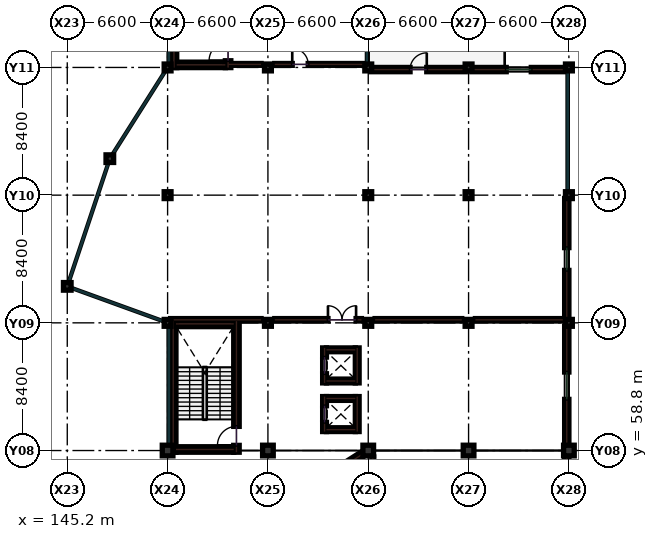
"""IFC4 building model, lengths in metres.
Left out: names, types, materials, properties, quantities, classifications, styles, units other than length and angle.
Written with IfcOpenShell. Run it as: python <this file> out.ifc"""

import sys

from ifc_helpers import new_model, si_unit, direction, frame, frame_2d, origin, origin_2d, place, context, subcontext, project, spatial, rectangle, extrude, element, fill, save


model = new_model("IFC4")
c1 = context("Model", 3, precision=1e-05, world=origin(), true_north=direction((0.0, 1.0)))
c2 = subcontext(c1, "Body", "Model", "MODEL_VIEW")
j1 = project(units=[si_unit("LENGTHUNIT", "METRE"), si_unit("PLANEANGLEUNIT", "RADIAN")], contexts=[c1])
p1 = place(None, origin())
s1 = spatial("IfcSite", under=j1, at=p1, CompositionType="ELEMENT")
p2 = place(p1, origin())
s2 = spatial("IfcBuilding", under=s1, at=p2, CompositionType="ELEMENT")
p3 = place(p2, frame((0.0, 0.0, 14.4)))
s3 = spatial("IfcBuildingStorey", under=s2, at=p3, CompositionType="ELEMENT", Elevation=14.4)
p4 = place(p3, frame((151.8, 58.8, 0.0), z_axis=(0.0, 0.0, 1.0), x_axis=(1.0, 0.0, 0.0)))
e1 = element("IfcColumn", 1, at=p4, inside=s3, PredefinedType="COLUMN", context=c2, shape_type="SweptSolid", body=[
    extrude(rectangle(XDim=0.7, YDim=0.7, at=origin_2d()), origin(), (0.0, 0.0, 1.0), 4.2),
])
for number, where, z_axis, x_axis in (
    (2, (151.8, 67.2, 0.0), (0.0, 0.0, 1.0), (1.0, 0.0, 0.0)),
    (3, (151.8, 75.6, 0.0), (0.0, 0.0, 1.0), (1.0, 0.0, 0.0)),
    (4, (151.8, 84.0, 0.0), (0.0, 0.0, 1.0), (1.0, 0.0, 0.0)),
):
    element("IfcColumn", number, at=place(p3, frame(where, z_axis=z_axis, x_axis=x_axis)), inside=s3, PredefinedType="COLUMN", context=c2, shape_type="SweptSolid", body=[
        extrude(rectangle(XDim=0.45, YDim=0.45, at=origin_2d()), origin(), (0.0, 0.0, 1.0), 4.2),
    ])
p5 = place(p3, frame((158.4, 58.8, 0.0), z_axis=(0.0, 0.0, 1.0), x_axis=(1.0, 0.0, 0.0)))
e5 = element("IfcColumn", 5, at=p5, inside=s3, PredefinedType="COLUMN", context=c2, shape_type="SweptSolid", body=[
    extrude(rectangle(XDim=0.7, YDim=0.7, at=origin_2d()), origin(), (0.0, 0.0, 1.0), 4.2),
])
for number, where, z_axis, x_axis in (
    (6, (158.4, 67.2, 0.0), (0.0, 0.0, 1.0), (1.0, 0.0, 0.0)),
    (7, (158.4, 84.0, 0.0), (0.0, 0.0, 1.0), (1.0, 0.0, 0.0)),
):
    element("IfcColumn", number, at=place(p3, frame(where, z_axis=z_axis, x_axis=x_axis)), inside=s3, PredefinedType="COLUMN", context=c2, shape_type="SweptSolid", body=[
        extrude(rectangle(XDim=0.45, YDim=0.45, at=origin_2d()), origin(), (0.0, 0.0, 1.0), 4.2),
    ])
p6 = place(p3, frame((165.0, 58.8, 0.0), z_axis=(0.0, 0.0, 1.0), x_axis=(1.0, 0.0, 0.0)))
e8 = element("IfcColumn", 8, at=p6, inside=s3, PredefinedType="COLUMN", context=c2, shape_type="SweptSolid", body=[
    extrude(rectangle(XDim=0.7, YDim=0.7, at=origin_2d()), origin(), (0.0, 0.0, 1.0), 4.2),
])
for number, where, z_axis, x_axis in (
    (9, (165.0, 67.2, 0.0), (0.0, 0.0, 1.0), (1.0, 0.0, 0.0)),
    (10, (165.0, 75.6, 0.0), (0.0, 0.0, 1.0), (1.0, 0.0, 0.0)),
    (11, (165.0, 84.0, 0.0), (0.0, 0.0, 1.0), (1.0, 0.0, 0.0)),
):
    element("IfcColumn", number, at=place(p3, frame(where, z_axis=z_axis, x_axis=x_axis)), inside=s3, PredefinedType="COLUMN", context=c2, shape_type="SweptSolid", body=[
        extrude(rectangle(XDim=0.45, YDim=0.45, at=origin_2d()), origin(), (0.0, 0.0, 1.0), 4.2),
    ])
p7 = place(p3, frame((171.6, 58.8, 0.0), z_axis=(0.0, 0.0, 1.0), x_axis=(1.0, 0.0, 0.0)))
e12 = element("IfcColumn", 12, at=p7, inside=s3, PredefinedType="COLUMN", context=c2, shape_type="SweptSolid", body=[
    extrude(rectangle(XDim=0.7, YDim=0.7, at=origin_2d()), origin(), (0.0, 0.0, 1.0), 4.2),
])
for number, where, z_axis, x_axis in (
    (13, (171.6, 67.2, 0.0), (0.0, 0.0, 1.0), (1.0, 0.0, 0.0)),
    (14, (171.6, 75.6, 0.0), (0.0, 0.0, 1.0), (1.0, 0.0, 0.0)),
    (15, (171.6, 84.0, 0.0), (0.0, 0.0, 1.0), (1.0, 0.0, 0.0)),
):
    element("IfcColumn", number, at=place(p3, frame(where, z_axis=z_axis, x_axis=x_axis)), inside=s3, PredefinedType="COLUMN", context=c2, shape_type="SweptSolid", body=[
        extrude(rectangle(XDim=0.45, YDim=0.45, at=origin_2d()), origin(), (0.0, 0.0, 1.0), 4.2),
    ])
p8 = place(p3, frame((178.2, 58.8, 0.0), z_axis=(0.0, 0.0, 1.0), x_axis=(1.0, 0.0, 0.0)))
e16 = element("IfcColumn", 16, at=p8, inside=s3, PredefinedType="COLUMN", context=c2, shape_type="SweptSolid", body=[
    extrude(rectangle(XDim=0.7, YDim=0.7, at=origin_2d()), origin(), (0.0, 0.0, 1.0), 4.2),
])
for number, where, z_axis, x_axis in (
    (17, (178.2, 67.2, 0.0), (0.0, 0.0, 1.0), (1.0, 0.0, 0.0)),
    (18, (178.2, 75.6, 0.0), (0.0, 0.0, 1.0), (1.0, 0.0, 0.0)),
    (19, (178.2, 84.0, 0.0), (0.0, 0.0, 1.0), (1.0, 0.0, 0.0)),
):
    element("IfcColumn", number, at=place(p3, frame(where, z_axis=z_axis, x_axis=x_axis)), inside=s3, PredefinedType="COLUMN", context=c2, shape_type="SweptSolid", body=[
        extrude(rectangle(XDim=0.45, YDim=0.45, at=origin_2d()), origin(), (0.0, 0.0, 1.0), 4.2),
    ])
for number, where, z_axis, x_axis in (
    (20, (145.2, 69.6, 0.0), (0.0, 0.0, 1.0), (1.0, 0.0, 0.0)),
    (21, (148.0, 78.0, 0.0), (0.0, 0.0, 1.0), (1.0, 0.0, 0.0)),
):
    element("IfcColumn", number, at=place(p3, frame(where, z_axis=z_axis, x_axis=x_axis)), inside=s3, PredefinedType="COLUMN", context=c2, shape_type="SweptSolid", body=[
        extrude(rectangle(XDim=0.5, YDim=0.5, at=origin_2d()), origin(), (0.0, 0.0, 1.0), 4.2),
    ])
p9 = place(p3, frame((152.0, 67.4, 0.0), z_axis=(0.0, 0.0, 1.0), x_axis=(1.0, 0.0, 0.0)))
e22 = element("IfcWall", 22, at=p9, inside=s3, PredefinedType="PARTITIONING", context=c2, shape_type="SweptSolid", body=[
    extrude(rectangle(XDim=5.95, YDim=0.16, at=frame_2d((2.975, 0.0))), origin(), (0.0, 0.0, 1.0), 3.19),
])
p10 = place(p3, frame((158.85, 67.4, 0.0), z_axis=(0.0, 0.0, 1.0), x_axis=(1.0, 0.0, 0.0)))
e23 = element("IfcWall", 23, at=p10, inside=s3, PredefinedType="PARTITIONING", context=c2, shape_type="SweptSolid", body=[
    extrude(rectangle(XDim=5.7, YDim=0.16, at=frame_2d((2.85, 0.0))), origin(), (0.0, 0.0, 1.0), 3.19),
])
p11 = place(p10, frame((3.5, 0.0, 0.0)))
e24 = element("IfcOpeningElement", 24, at=p11, cuts=e23, PredefinedType="OPENING", context=c2, shape_type="SweptSolid", body=[
    extrude(rectangle(XDim=1.85, YDim=2.25, at=frame_2d((0.925, 1.125))), frame((0.0, 0.09, 0.0), z_axis=(0.0, -1.0, 0.0), x_axis=(1.0, 0.0, 0.0)), (0.0, 0.0, 1.0), 0.18),
])
p12 = place(p3, frame((165.45, 67.4, 0.0), z_axis=(0.0, 0.0, 1.0), x_axis=(1.0, 0.0, 0.0)))
e25 = element("IfcWall", 25, at=p12, inside=s3, PredefinedType="PARTITIONING", context=c2, shape_type="SweptSolid", body=[
    extrude(rectangle(XDim=5.7, YDim=0.16, at=frame_2d((2.85, 0.0))), origin(), (0.0, 0.0, 1.0), 3.19),
])
p13 = place(p3, frame((172.05, 67.4, 0.0), z_axis=(0.0, 0.0, 1.0), x_axis=(1.0, 0.0, 0.0)))
e26 = element("IfcWall", 26, at=p13, inside=s3, PredefinedType="PARTITIONING", context=c2, shape_type="SweptSolid", body=[
    extrude(rectangle(XDim=5.83, YDim=0.16, at=frame_2d((2.915, 0.0))), origin(), (0.0, 0.0, 1.0), 3.19),
])
p14 = place(p3, frame((155.8, 84.2, 0.0), z_axis=(0.0, 0.0, 1.0), x_axis=(1.0, 0.0, 0.0)))
e27 = element("IfcWall", 27, at=p14, inside=s3, PredefinedType="PARTITIONING", context=c2, shape_type="SweptSolid", body=[
    extrude(rectangle(XDim=2.15, YDim=0.12, at=frame_2d((1.075, 0.0))), origin(), (0.0, 0.0, 1.0), 3.19),
])
p15 = place(p3, frame((158.85, 84.2, 0.0), z_axis=(0.0, 0.0, 1.0), x_axis=(1.0, 0.0, 0.0)))
e28 = element("IfcWall", 28, at=p15, inside=s3, PredefinedType="PARTITIONING", context=c2, shape_type="SweptSolid", body=[
    extrude(rectangle(XDim=5.83, YDim=0.12, at=frame_2d((2.915, 0.0))), origin(), (0.0, 0.0, 1.0), 3.19),
])
p16 = place(p15, frame((1.15, 0.0, 0.0)))
e29 = element("IfcOpeningElement", 29, at=p16, cuts=e28, PredefinedType="OPENING", context=c2, shape_type="SweptSolid", body=[
    extrude(rectangle(XDim=1.05, YDim=2.15, at=frame_2d((0.525, 1.075))), frame((0.0, 0.07, 0.0), z_axis=(0.0, -1.0, 0.0), x_axis=(1.0, 0.0, 0.0)), (0.0, 0.0, 1.0), 0.14),
])
p17 = place(p3, frame((165.3, 50.85, 0.0), z_axis=(0.0, 0.0, 1.0), x_axis=(0.0, 1.0, 0.0)))
e30 = element("IfcWall", 30, at=p17, inside=s3, PredefinedType="PARTITIONING", context=c2, shape_type="SweptSolid", body=[
    extrude(rectangle(XDim=7.53, YDim=0.12, at=frame_2d((3.765, 0.0))), origin(), (0.0, 0.0, 1.0), 3.19),
])
p18 = place(p17, frame((4.4, 0.0, 0.0)))
e31 = element("IfcOpeningElement", 31, at=p18, cuts=e30, PredefinedType="OPENING", context=c2, shape_type="SweptSolid", body=[
    extrude(rectangle(XDim=0.95, YDim=2.15, at=frame_2d((0.475, 1.075))), frame((0.0, 0.07, 0.0), z_axis=(0.0, -1.0, 0.0), x_axis=(1.0, 0.0, 0.0)), (0.0, 0.0, 1.0), 0.14),
])
p19 = place(p3, frame((171.38, 83.86, 0.0), z_axis=(0.0, 0.0, 1.0), x_axis=(-1.0, 0.0, 0.0)))
e32 = element("IfcWall", 32, at=p19, inside=s3, PredefinedType="SOLIDWALL", context=c2, shape_type="SweptSolid", body=[
    extrude(rectangle(XDim=6.16, YDim=0.28, at=frame_2d((3.08, 0.0))), origin(), (0.0, 0.0, 1.0), 3.325),
])
p20 = place(p19, frame((2.53, 0.0, 0.0)))
e33 = element("IfcOpeningElement", 33, at=p20, cuts=e32, PredefinedType="OPENING", context=c2, shape_type="SweptSolid", body=[
    extrude(rectangle(XDim=1.1, YDim=2.2, at=frame_2d((0.55, 1.1))), frame((0.0, 0.15, 0.0), z_axis=(0.0, -1.0, 0.0), x_axis=(1.0, 0.0, 0.0)), (0.0, 0.0, 1.0), 0.3),
])
p21 = place(p3, frame((178.06, 50.745, 0.0), z_axis=(0.0, 0.0, 1.0), x_axis=(0.0, 1.0, 0.0)))
e34 = element("IfcWall", 34, at=p21, inside=s3, PredefinedType="SOLIDWALL", context=c2, shape_type="SweptSolid", body=[
    extrude(rectangle(XDim=7.71, YDim=0.28, at=frame_2d((3.855, 0.0))), origin(), (0.0, 0.0, 1.0), 3.225),
])
p22 = place(p21, frame((3.13, 0.0, 0.95)))
e35 = element("IfcOpeningElement", 35, at=p22, cuts=e34, PredefinedType="OPENING", context=c2, shape_type="SweptSolid", body=[
    extrude(rectangle(XDim=1.45, YDim=1.6, at=frame_2d((0.725, 0.8))), frame((0.0, 0.15, 0.0), z_axis=(0.0, -1.0, 0.0), x_axis=(1.0, 0.0, 0.0)), (0.0, 0.0, 1.0), 0.3),
])
p23 = place(p3, frame((178.06, 59.145, 0.0), z_axis=(0.0, 0.0, 1.0), x_axis=(0.0, 1.0, 0.0)))
e36 = element("IfcWall", 36, at=p23, inside=s3, PredefinedType="SOLIDWALL", context=c2, shape_type="SweptSolid", body=[
    extrude(rectangle(XDim=7.835, YDim=0.28, at=frame_2d((3.917, 0.0))), origin(), (0.0, 0.0, 1.0), 3.375),
])
p24 = place(p23, frame((3.02, 0.0, 0.95)))
e37 = element("IfcOpeningElement", 37, at=p24, cuts=e36, PredefinedType="OPENING", context=c2, shape_type="SweptSolid", body=[
    extrude(rectangle(XDim=1.8, YDim=1.6, at=frame_2d((0.9, 0.8))), frame((0.0, 0.15, 0.0), z_axis=(0.0, -1.0, 0.0), x_axis=(1.0, 0.0, 0.0)), (0.0, 0.0, 1.0), 0.3),
])
p25 = place(p3, frame((178.06, 67.42, 0.0), z_axis=(0.0, 0.0, 1.0), x_axis=(0.0, 1.0, 0.0)))
e38 = element("IfcWall", 38, at=p25, inside=s3, PredefinedType="SOLIDWALL", context=c2, shape_type="SweptSolid", body=[
    extrude(rectangle(XDim=7.96, YDim=0.28, at=frame_2d((3.98, 0.0))), origin(), (0.0, 0.0, 1.0), 3.225),
])
p26 = place(p25, frame((3.23, 0.0, 0.95)))
e39 = element("IfcOpeningElement", 39, at=p26, cuts=e38, PredefinedType="OPENING", context=c2, shape_type="SweptSolid", body=[
    extrude(rectangle(XDim=1.5, YDim=2.1, at=frame_2d((0.75, 1.05))), frame((0.0, 0.15, 0.0), z_axis=(0.0, -1.0, 0.0), x_axis=(1.0, 0.0, 0.0)), (0.0, 0.0, 1.0), 0.3),
])
p27 = place(p3, frame((177.98, 83.86, 0.0), z_axis=(0.0, 0.0, 1.0), x_axis=(-1.0, 0.0, 0.0)))
e40 = element("IfcWall", 40, at=p27, inside=s3, PredefinedType="SOLIDWALL", context=c2, shape_type="SweptSolid", body=[
    extrude(rectangle(XDim=6.16, YDim=0.28, at=frame_2d((3.08, 0.0))), origin(), (0.0, 0.0, 1.0), 3.325),
])
p28 = place(p27, frame((2.255, 0.0, 0.95)))
e41 = element("IfcOpeningElement", 41, at=p28, cuts=e40, PredefinedType="OPENING", context=c2, shape_type="SweptSolid", body=[
    extrude(rectangle(XDim=1.65, YDim=1.55, at=frame_2d((0.825, 0.775))), frame((0.0, 0.15, 0.0), z_axis=(0.0, -1.0, 0.0), x_axis=(1.0, 0.0, 0.0)), (0.0, 0.0, 1.0), 0.3),
])
p29 = place(p3, frame((158.65, 54.76, 0.0), z_axis=(0.0, 0.0, 1.0), x_axis=(0.843786613851, 0.536678814829, 0.0)))
e42 = element("IfcWall", 42, at=p29, inside=s3, PredefinedType="SHEAR", context=c2, shape_type="SweptSolid", body=[
    extrude(rectangle(XDim=7.229, YDim=0.34, at=frame_2d((3.615, 0.0))), origin(), (0.0, 0.0, 1.0), 3.94),
])
p30 = place(p3, frame((152.17, 58.69, 0.0), z_axis=(0.0, 0.0, 1.0), x_axis=(0.0, 1.0, 0.0)))
e43 = element("IfcWall", 43, at=p30, inside=s3, PredefinedType="SHEAR", context=c2, shape_type="SweptSolid", body=[
    extrude(rectangle(XDim=8.62, YDim=0.36, at=frame_2d((4.31, 0.0))), origin(), (0.0, 0.0, 1.0), 3.94),
])
p31 = place(p3, frame((156.33, 58.69, 0.0), z_axis=(0.0, 0.0, 1.0), x_axis=(0.0, 1.0, 0.0)))
e44 = element("IfcWall", 44, at=p31, inside=s3, PredefinedType="SHEAR", context=c2, shape_type="SweptSolid", body=[
    extrude(rectangle(XDim=8.62, YDim=0.36, at=frame_2d((4.31, 0.0))), origin(), (0.0, 0.0, 1.0), 3.94),
])
p32 = place(p31, frame((0.45, 0.0, 0.0)))
e45 = element("IfcOpeningElement", 45, at=p32, cuts=e44, PredefinedType="OPENING", context=c2, shape_type="SweptSolid", body=[
    extrude(rectangle(XDim=1.25, YDim=2.15, at=frame_2d((0.625, 1.075))), frame((0.0, 0.19, 0.0), z_axis=(0.0, -1.0, 0.0), x_axis=(1.0, 0.0, 0.0)), (0.0, 0.0, 1.0), 0.38),
])
for number, where, z_axis, x_axis in (
    (46, (152.35, 67.13, 0.0), (0.0, 0.0, 1.0), (1.0, 0.0, 0.0)),
    (47, (152.35, 58.87, 0.0), (0.0, 0.0, 1.0), (1.0, 0.0, 0.0)),
):
    element("IfcWall", number, at=place(p3, frame(where, z_axis=z_axis, x_axis=x_axis)), inside=s3, PredefinedType="SHEAR", context=c2, shape_type="SweptSolid", body=[
        extrude(rectangle(XDim=3.8, YDim=0.36, at=frame_2d((1.9, 0.0))), origin(), (0.0, 0.0, 1.0), 3.94),
    ])
p33 = place(p3, frame((152.22, 83.99, 0.0), z_axis=(0.0, 0.0, 1.0), x_axis=(0.0, 1.0, 0.0)))
e48 = element("IfcWall", 48, at=p33, inside=s3, PredefinedType="SHEAR", context=c2, shape_type="SweptSolid", body=[
    extrude(rectangle(XDim=8.17, YDim=0.36, at=frame_2d((4.085, 0.0))), origin(), (0.0, 0.0, 1.0), 3.94),
])
p34 = place(p3, frame((155.78, 83.99, 0.0), z_axis=(0.0, 0.0, 1.0), x_axis=(0.0, 1.0, 0.0)))
e49 = element("IfcWall", 49, at=p34, inside=s3, PredefinedType="SHEAR", context=c2, shape_type="SweptSolid", body=[
    extrude(rectangle(XDim=8.17, YDim=0.36, at=frame_2d((4.085, 0.0))), origin(), (0.0, 0.0, 1.0), 3.94),
])
p35 = place(p34, frame((0.45, 0.0, 0.0)))
e50 = element("IfcOpeningElement", 50, at=p35, cuts=e49, PredefinedType="OPENING", context=c2, shape_type="SweptSolid", body=[
    extrude(rectangle(XDim=1.25, YDim=2.15, at=frame_2d((0.625, 1.075))), frame((0.0, 0.19, 0.0), z_axis=(0.0, -1.0, 0.0), x_axis=(1.0, 0.0, 0.0)), (0.0, 0.0, 1.0), 0.38),
])
p36 = place(p3, frame((152.4, 84.17, 0.0), z_axis=(0.0, 0.0, 1.0), x_axis=(1.0, 0.0, 0.0)))
e51 = element("IfcWall", 51, at=p36, inside=s3, PredefinedType="SHEAR", context=c2, shape_type="SweptSolid", body=[
    extrude(rectangle(XDim=3.2, YDim=0.36, at=frame_2d((1.6, 0.0))), origin(), (0.0, 0.0, 1.0), 3.94),
])
p37 = place(p3, frame((162.125, 60.05, 0.0), z_axis=(0.0, 0.0, 1.0), x_axis=(0.0, 1.0, 0.0)))
e52 = element("IfcWall", 52, at=p37, inside=s3, PredefinedType="SHEAR", context=c2, shape_type="SweptSolid", body=[
    extrude(rectangle(XDim=2.3, YDim=0.25, at=frame_2d((1.15, 0.0))), origin(), (0.0, 0.0, 1.0), 3.94),
])
p38 = place(p37, frame((0.6, 0.0, 0.0)))
e53 = element("IfcOpeningElement", 53, at=p38, cuts=e52, PredefinedType="OPENING", context=c2, shape_type="SweptSolid", body=[
    extrude(rectangle(XDim=1.1, YDim=2.15, at=frame_2d((0.55, 1.075))), frame((0.0, 0.135, 0.0), z_axis=(0.0, -1.0, 0.0), x_axis=(1.0, 0.0, 0.0)), (0.0, 0.0, 1.0), 0.27),
])
p39 = place(p3, frame((164.275, 60.05, 0.0), z_axis=(0.0, 0.0, 1.0), x_axis=(0.0, 1.0, 0.0)))
e54 = element("IfcWall", 54, at=p39, inside=s3, PredefinedType="SHEAR", context=c2, shape_type="SweptSolid", body=[
    extrude(rectangle(XDim=2.3, YDim=0.25, at=frame_2d((1.15, 0.0))), origin(), (0.0, 0.0, 1.0), 3.94),
])
for number, where, z_axis, x_axis in (
    (55, (162.25, 60.175, 0.0), (0.0, 0.0, 1.0), (1.0, 0.0, 0.0)),
    (56, (162.25, 62.225, 0.0), (0.0, 0.0, 1.0), (1.0, 0.0, 0.0)),
):
    element("IfcWall", number, at=place(p3, frame(where, z_axis=z_axis, x_axis=x_axis)), inside=s3, PredefinedType="SHEAR", context=c2, shape_type="SweptSolid", body=[
        extrude(rectangle(XDim=1.9, YDim=0.25, at=frame_2d((0.95, 0.0))), origin(), (0.0, 0.0, 1.0), 3.94),
    ])
p40 = place(p3, frame((162.125, 63.25, 0.0), z_axis=(0.0, 0.0, 1.0), x_axis=(0.0, 1.0, 0.0)))
e57 = element("IfcWall", 57, at=p40, inside=s3, PredefinedType="SHEAR", context=c2, shape_type="SweptSolid", body=[
    extrude(rectangle(XDim=2.3, YDim=0.25, at=frame_2d((1.15, 0.0))), origin(), (0.0, 0.0, 1.0), 3.94),
])
p41 = place(p40, frame((0.6, 0.0, 0.0)))
e58 = element("IfcOpeningElement", 58, at=p41, cuts=e57, PredefinedType="OPENING", context=c2, shape_type="SweptSolid", body=[
    extrude(rectangle(XDim=1.1, YDim=2.15, at=frame_2d((0.55, 1.075))), frame((0.0, 0.135, 0.0), z_axis=(0.0, -1.0, 0.0), x_axis=(1.0, 0.0, 0.0)), (0.0, 0.0, 1.0), 0.27),
])
p42 = place(p3, frame((164.275, 63.25, 0.0), z_axis=(0.0, 0.0, 1.0), x_axis=(0.0, 1.0, 0.0)))
e59 = element("IfcWall", 59, at=p42, inside=s3, PredefinedType="SHEAR", context=c2, shape_type="SweptSolid", body=[
    extrude(rectangle(XDim=2.3, YDim=0.25, at=frame_2d((1.15, 0.0))), origin(), (0.0, 0.0, 1.0), 3.94),
])
for number, where, z_axis, x_axis in (
    (60, (162.25, 63.375, 0.0), (0.0, 0.0, 1.0), (1.0, 0.0, 0.0)),
    (61, (162.25, 65.425, 0.0), (0.0, 0.0, 1.0), (1.0, 0.0, 0.0)),
):
    element("IfcWall", number, at=place(p3, frame(where, z_axis=z_axis, x_axis=x_axis)), inside=s3, PredefinedType="SHEAR", context=c2, shape_type="SweptSolid", body=[
        extrude(rectangle(XDim=1.9, YDim=0.25, at=frame_2d((0.95, 0.0))), origin(), (0.0, 0.0, 1.0), 3.94),
    ])
p43 = place(p11, origin())
e62 = element("IfcDoor", 62, at=p43, inside=s3, OperationType="DOUBLE_DOOR_SINGLE_SWING", PredefinedType="DOOR", context=c2, shape_type="SweptSolid", body=[
    extrude(rectangle(XDim=1.85, YDim=2.25, at=frame_2d((0.925, 1.125))), frame((0.0, 0.025, 0.0), z_axis=(0.0, -1.0, 0.0), x_axis=(1.0, 0.0, 0.0)), (0.0, 0.0, 1.0), 0.05),
])
fill(e24, e62)
p44 = place(p16, origin())
e63 = element("IfcDoor", 63, at=p44, inside=s3, OperationType="SINGLE_SWING_LEFT", PredefinedType="DOOR", context=c2, shape_type="SweptSolid", body=[
    extrude(rectangle(XDim=1.05, YDim=2.15, at=frame_2d((0.525, 1.075))), frame((0.0, 0.025, 0.0), z_axis=(0.0, -1.0, 0.0), x_axis=(1.0, 0.0, 0.0)), (0.0, 0.0, 1.0), 0.05),
])
fill(e29, e63)
p45 = place(p20, frame((1.1, 0.0, 0.0), z_axis=(0.0, 0.0, 1.0), x_axis=(-1.0, 0.0, 0.0)))
e64 = element("IfcDoor", 64, at=p45, inside=s3, OperationType="SINGLE_SWING_LEFT", PredefinedType="DOOR", context=c2, shape_type="SweptSolid", body=[
    extrude(rectangle(XDim=1.1, YDim=2.2, at=frame_2d((0.55, 1.1))), frame((0.0, 0.025, 0.0), z_axis=(0.0, -1.0, 0.0), x_axis=(1.0, 0.0, 0.0)), (0.0, 0.0, 1.0), 0.05),
])
fill(e33, e64)
p46 = place(p24, origin())
e65 = element("IfcWindow", 65, at=p46, inside=s3, PartitioningType="SINGLE_PANEL", PredefinedType="WINDOW", context=c2, shape_type="SweptSolid", body=[
    extrude(rectangle(XDim=1.8, YDim=1.6, at=frame_2d((0.9, 0.8))), frame((0.0, 0.03, 0.0), z_axis=(0.0, -1.0, 0.0), x_axis=(1.0, 0.0, 0.0)), (0.0, 0.0, 1.0), 0.06),
])
fill(e37, e65)
p47 = place(p26, origin())
e66 = element("IfcWindow", 66, at=p47, inside=s3, PartitioningType="SINGLE_PANEL", PredefinedType="WINDOW", context=c2, shape_type="SweptSolid", body=[
    extrude(rectangle(XDim=1.5, YDim=2.1, at=frame_2d((0.75, 1.05))), frame((0.0, 0.03, 0.0), z_axis=(0.0, -1.0, 0.0), x_axis=(1.0, 0.0, 0.0)), (0.0, 0.0, 1.0), 0.06),
])
fill(e39, e66)
p48 = place(p28, origin())
e67 = element("IfcWindow", 67, at=p48, inside=s3, PartitioningType="SINGLE_PANEL", PredefinedType="WINDOW", context=c2, shape_type="SweptSolid", body=[
    extrude(rectangle(XDim=1.65, YDim=1.55, at=frame_2d((0.825, 0.775))), frame((0.0, 0.03, 0.0), z_axis=(0.0, -1.0, 0.0), x_axis=(1.0, 0.0, 0.0)), (0.0, 0.0, 1.0), 0.06),
])
fill(e41, e67)
p49 = place(p32, origin())
e68 = element("IfcDoor", 68, at=p49, inside=s3, OperationType="SINGLE_SWING_LEFT", PredefinedType="DOOR", context=c2, shape_type="SweptSolid", body=[
    extrude(rectangle(XDim=1.25, YDim=2.15, at=frame_2d((0.625, 1.075))), frame((0.0, 0.025, 0.0), z_axis=(0.0, -1.0, 0.0), x_axis=(1.0, 0.0, 0.0)), (0.0, 0.0, 1.0), 0.05),
])
fill(e45, e68)
p50 = place(p35, origin())
e69 = element("IfcDoor", 69, at=p50, inside=s3, OperationType="SINGLE_SWING_LEFT", PredefinedType="DOOR", context=c2, shape_type="SweptSolid", body=[
    extrude(rectangle(XDim=1.25, YDim=2.15, at=frame_2d((0.625, 1.075))), frame((0.0, 0.025, 0.0), z_axis=(0.0, -1.0, 0.0), x_axis=(1.0, 0.0, 0.0)), (0.0, 0.0, 1.0), 0.05),
])
fill(e50, e69)
p51 = place(p38, origin())
e70 = element("IfcDoor", 70, at=p51, inside=s3, OperationType="SLIDING_TO_LEFT", PredefinedType="DOOR", context=c2, shape_type="SweptSolid", body=[
    extrude(rectangle(XDim=1.1, YDim=2.15, at=frame_2d((0.55, 1.075))), frame((0.0, 0.025, 0.0), z_axis=(0.0, -1.0, 0.0), x_axis=(1.0, 0.0, 0.0)), (0.0, 0.0, 1.0), 0.05),
])
fill(e53, e70)
p52 = place(p41, origin())
e71 = element("IfcDoor", 71, at=p52, inside=s3, OperationType="SLIDING_TO_LEFT", PredefinedType="DOOR", context=c2, shape_type="SweptSolid", body=[
    extrude(rectangle(XDim=1.1, YDim=2.15, at=frame_2d((0.55, 1.075))), frame((0.0, 0.025, 0.0), z_axis=(0.0, -1.0, 0.0), x_axis=(1.0, 0.0, 0.0)), (0.0, 0.0, 1.0), 0.05),
])
fill(e58, e71)
save(model, sys.argv[1])
